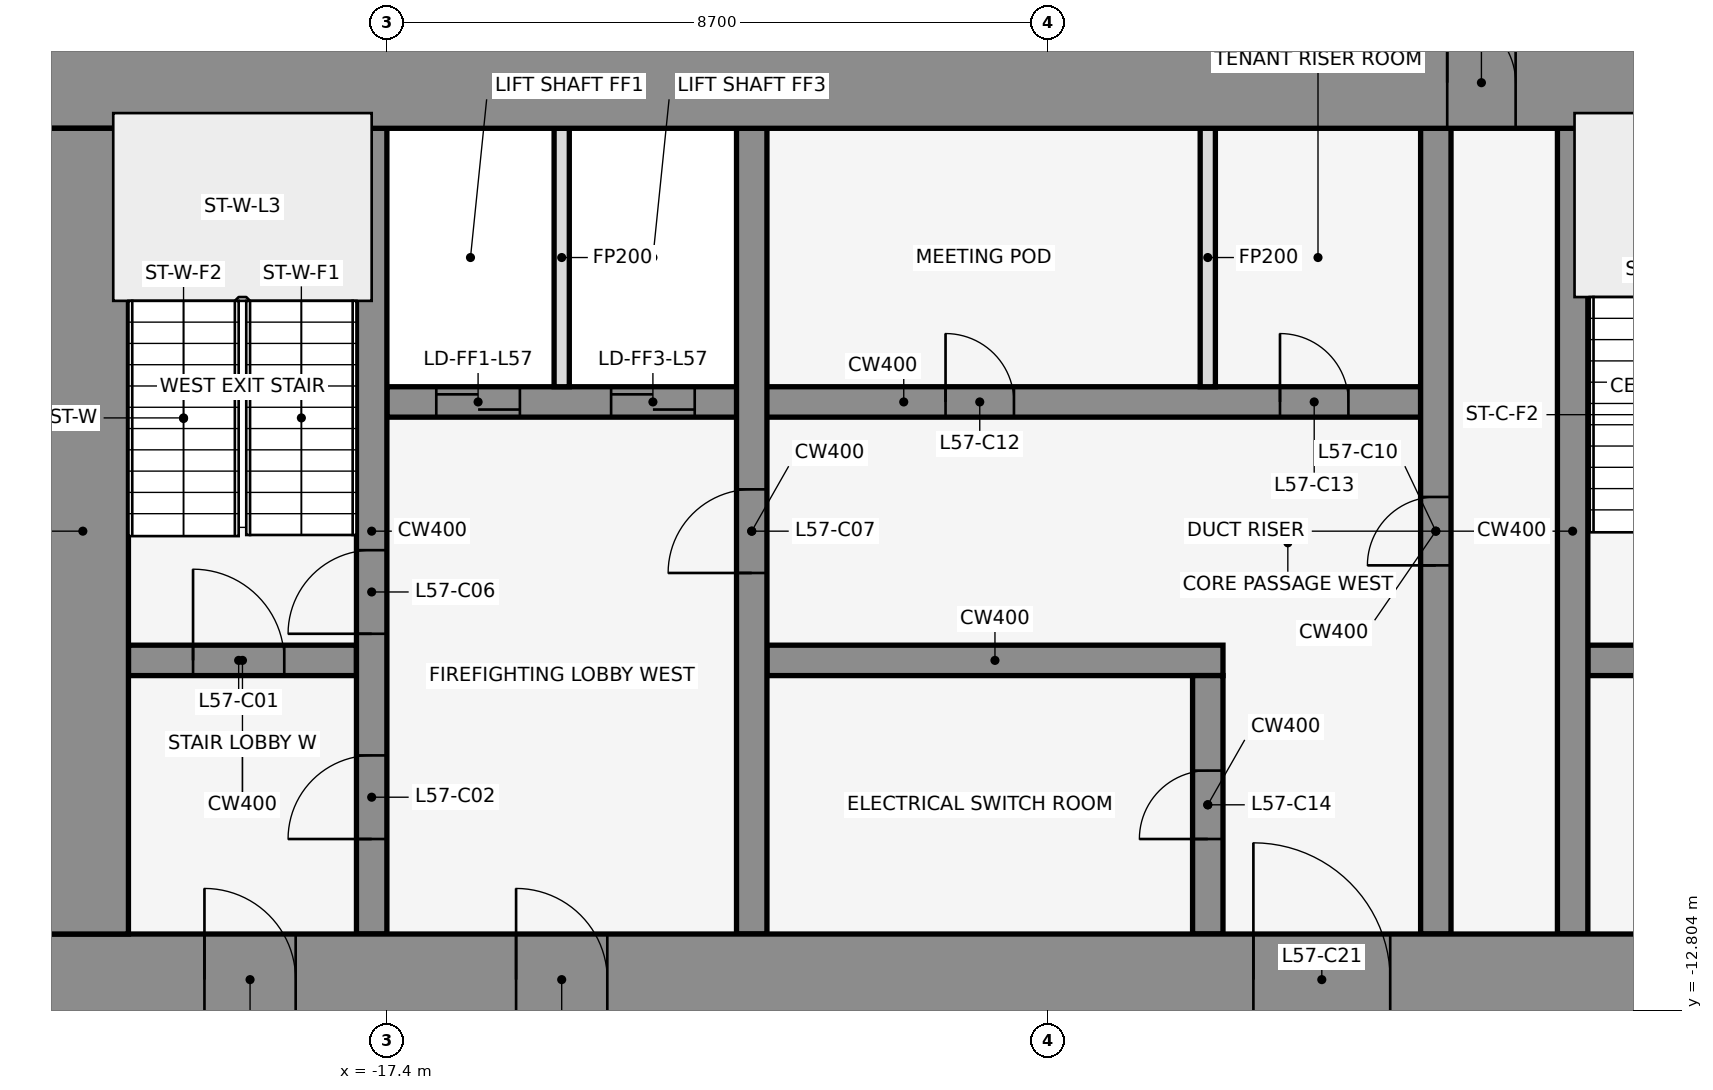
"""IFC4 building model, lengths in metres.
Left out: names, types, materials, properties, quantities, classifications, styles, units other than length and angle.
Written with IfcOpenShell. Run it as: python <this file> out.ifc"""

import sys

from ifc_helpers import new_model, si_unit, direction, frame, frame_2d, origin, place, context, subcontext, project, spatial, rectangle, extrude, element, fill, save


model = new_model("IFC4")
c1 = context("Model", 3, precision=1e-05, world=origin(), true_north=direction((0.0, 1.0)))
c2 = subcontext(c1, "Body", "Model", "MODEL_VIEW")
j1 = project(units=[si_unit("LENGTHUNIT", "METRE"), si_unit("PLANEANGLEUNIT", "RADIAN")], contexts=[c1])
p1 = place(None, origin())
s1 = spatial("IfcSite", under=j1, at=p1, CompositionType="ELEMENT")
p2 = place(p1, origin())
s2 = spatial("IfcBuilding", under=s1, at=p2, CompositionType="ELEMENT")
p3 = place(p2, frame((0.0, 0.0, 254.0)))
s3 = spatial("IfcBuildingStorey", under=s2, at=p3, CompositionType="ELEMENT", Elevation=254.0)
for number, where, z_axis, x_axis in (
    (1, (-0.068, -0.105, 0.0), (0.0, 0.0, 1.0), (-0.84, 0.543, 0.0)),
    (2, (-14.599, 1.08, 0.0), (0.0, 0.0, 1.0), (-0.84, -0.543, 0.0)),
):
    element("IfcWall", number, at=place(p3, frame(where, z_axis=z_axis, x_axis=x_axis)), inside=s3, PredefinedType="STANDARD", context=c2, shape_type="SweptSolid", body=[
        extrude(rectangle(XDim=2.183, YDim=0.25, at=frame_2d((1.091, 0.0))), origin(), (0.0, 0.0, 1.0), 4.05),
    ])
p4 = place(p3, frame((-20.8, -8.2, 0.0), z_axis=(0.0, 0.0, 1.0), x_axis=(1.0, 0.0, 0.0)))
e3 = element("IfcWall", 3, at=p4, inside=s3, PredefinedType="SHEAR", context=c2, shape_type="SweptSolid", body=[
    extrude(rectangle(XDim=3.0, YDim=0.4, at=frame_2d((1.5, 0.0))), origin(), (0.0, 0.0, 1.0), 4.2),
])
p5 = place(p4, frame((0.85, 0.0, 0.0)))
e4 = element("IfcOpeningElement", 4, at=p5, cuts=e3, PredefinedType="OPENING", context=c2, shape_type="SweptSolid", body=[
    extrude(rectangle(XDim=1.2, YDim=2.1, at=frame_2d((0.6, 1.05))), frame((0.0, 0.212, 0.0), z_axis=(0.0, -1.0, 0.0), x_axis=(1.0, 0.0, 0.0)), (0.0, 0.0, 1.0), 0.424),
])
p6 = place(p3, frame((-12.4, -8.2, 0.0), z_axis=(0.0, 0.0, 1.0), x_axis=(1.0, 0.0, 0.0)))
e5 = element("IfcWall", 5, at=p6, inside=s3, PredefinedType="SHEAR", context=c2, shape_type="SweptSolid", body=[
    extrude(rectangle(XDim=6.0, YDim=0.4, at=frame_2d((3.0, 0.0))), origin(), (0.0, 0.0, 1.0), 4.2),
])
p7 = place(p3, frame((-1.6, -8.2, 0.0), z_axis=(0.0, 0.0, 1.0), x_axis=(1.0, 0.0, 0.0)))
e6 = element("IfcWall", 6, at=p7, inside=s3, PredefinedType="SHEAR", context=c2, shape_type="SweptSolid", body=[
    extrude(rectangle(XDim=3.2, YDim=0.4, at=frame_2d((1.6, 0.0))), origin(), (0.0, 0.0, 1.0), 4.2),
])
p8 = place(p7, frame((1.05, 0.0, 0.0)))
e7 = element("IfcOpeningElement", 7, at=p8, cuts=e6, PredefinedType="OPENING", context=c2, shape_type="SweptSolid", body=[
    extrude(rectangle(XDim=1.2, YDim=2.1, at=frame_2d((0.6, 1.05))), frame((0.0, 0.212, 0.0), z_axis=(0.0, -1.0, 0.0), x_axis=(1.0, 0.0, 0.0)), (0.0, 0.0, 1.0), 0.424),
])
p9 = place(p3, frame((-17.4, -4.8, 0.0), z_axis=(0.0, 0.0, 1.0), x_axis=(1.0, 0.0, 0.0)))
e8 = element("IfcWall", 8, at=p9, inside=s3, PredefinedType="SHEAR", context=c2, shape_type="SweptSolid", body=[
    extrude(rectangle(XDim=13.6, YDim=0.4, at=frame_2d((6.8, 0.0))), origin(), (0.0, 0.0, 1.0), 4.2),
])
p10 = place(p9, frame((0.65, 0.0, 0.0)))
e9 = element("IfcOpeningElement", 9, at=p10, cuts=e8, PredefinedType="OPENING", context=c2, shape_type="SweptSolid", body=[
    extrude(rectangle(XDim=1.1, YDim=2.1, at=frame_2d((0.55, 1.05))), frame((0.0, 0.212, 0.0), z_axis=(0.0, -1.0, 0.0), x_axis=(1.0, 0.0, 0.0)), (0.0, 0.0, 1.0), 0.424),
])
p11 = place(p9, frame((2.95, 0.0, 0.0)))
e10 = element("IfcOpeningElement", 10, at=p11, cuts=e8, PredefinedType="OPENING", context=c2, shape_type="SweptSolid", body=[
    extrude(rectangle(XDim=1.1, YDim=2.1, at=frame_2d((0.55, 1.05))), frame((0.0, 0.212, 0.0), z_axis=(0.0, -1.0, 0.0), x_axis=(1.0, 0.0, 0.0)), (0.0, 0.0, 1.0), 0.424),
])
p12 = place(p9, frame((7.35, 0.0, 0.0)))
e11 = element("IfcOpeningElement", 11, at=p12, cuts=e8, PredefinedType="OPENING", context=c2, shape_type="SweptSolid", body=[
    extrude(rectangle(XDim=0.9, YDim=2.1, at=frame_2d((0.45, 1.05))), frame((0.0, 0.212, 0.0), z_axis=(0.0, -1.0, 0.0), x_axis=(1.0, 0.0, 0.0)), (0.0, 0.0, 1.0), 0.424),
])
p13 = place(p9, frame((11.75, 0.0, 0.0)))
e12 = element("IfcOpeningElement", 12, at=p13, cuts=e8, PredefinedType="OPENING", context=c2, shape_type="SweptSolid", body=[
    extrude(rectangle(XDim=0.9, YDim=2.1, at=frame_2d((0.45, 1.05))), frame((0.0, 0.212, 0.0), z_axis=(0.0, -1.0, 0.0), x_axis=(1.0, 0.0, 0.0)), (0.0, 0.0, 1.0), 0.424),
])
p14 = place(p3, frame((-17.6, -11.8, 0.0), z_axis=(0.0, 0.0, 1.0), x_axis=(0.0, 1.0, 0.0)))
e13 = element("IfcWall", 13, at=p14, inside=s3, PredefinedType="SHEAR", context=c2, shape_type="SweptSolid", body=[
    extrude(rectangle(XDim=10.6, YDim=0.4, at=frame_2d((5.3, 0.0))), origin(), (0.0, 0.0, 1.0), 4.2),
])
p15 = place(p14, frame((1.25, 0.0, 0.0)))
e14 = element("IfcOpeningElement", 14, at=p15, cuts=e13, PredefinedType="OPENING", context=c2, shape_type="SweptSolid", body=[
    extrude(rectangle(XDim=1.1, YDim=2.1, at=frame_2d((0.55, 1.05))), frame((0.0, 0.212, 0.0), z_axis=(0.0, -1.0, 0.0), x_axis=(1.0, 0.0, 0.0)), (0.0, 0.0, 1.0), 0.424),
])
p16 = place(p14, frame((3.95, 0.0, 0.0)))
e15 = element("IfcOpeningElement", 15, at=p16, cuts=e13, PredefinedType="OPENING", context=c2, shape_type="SweptSolid", body=[
    extrude(rectangle(XDim=1.1, YDim=2.1, at=frame_2d((0.55, 1.05))), frame((0.0, 0.212, 0.0), z_axis=(0.0, -1.0, 0.0), x_axis=(1.0, 0.0, 0.0)), (0.0, 0.0, 1.0), 0.424),
])
p17 = place(p3, frame((-15.1, -4.6, 0.0), z_axis=(0.0, 0.0, 1.0), x_axis=(0.0, 1.0, 0.0)))
e16 = element("IfcWall", 16, at=p17, inside=s3, PredefinedType="PARTITIONING", context=c2, shape_type="SweptSolid", body=[
    extrude(rectangle(XDim=3.4, YDim=0.2, at=frame_2d((1.7, 0.0))), origin(), (0.0, 0.0, 1.0), 3.118),
])
p18 = place(p3, frame((-12.6, -11.8, 0.0), z_axis=(0.0, 0.0, 1.0), x_axis=(0.0, 1.0, 0.0)))
e17 = element("IfcWall", 17, at=p18, inside=s3, PredefinedType="SHEAR", context=c2, shape_type="SweptSolid", body=[
    extrude(rectangle(XDim=10.6, YDim=0.4, at=frame_2d((5.3, 0.0))), origin(), (0.0, 0.0, 1.0), 4.2),
])
p19 = place(p18, frame((4.75, 0.0, 0.0)))
e18 = element("IfcOpeningElement", 18, at=p19, cuts=e17, PredefinedType="OPENING", context=c2, shape_type="SweptSolid", body=[
    extrude(rectangle(XDim=1.1, YDim=2.1, at=frame_2d((0.55, 1.05))), frame((0.0, 0.212, 0.0), z_axis=(0.0, -1.0, 0.0), x_axis=(1.0, 0.0, 0.0)), (0.0, 0.0, 1.0), 0.424),
])
p20 = place(p3, frame((-6.6, -11.8, 0.0), z_axis=(0.0, 0.0, 1.0), x_axis=(0.0, 1.0, 0.0)))
e19 = element("IfcWall", 19, at=p20, inside=s3, PredefinedType="SHEAR", context=c2, shape_type="SweptSolid", body=[
    extrude(rectangle(XDim=3.4, YDim=0.4, at=frame_2d((1.7, 0.0))), origin(), (0.0, 0.0, 1.0), 4.2),
])
p21 = place(p20, frame((1.25, 0.0, 0.0)))
e20 = element("IfcOpeningElement", 20, at=p21, cuts=e19, PredefinedType="OPENING", context=c2, shape_type="SweptSolid", body=[
    extrude(rectangle(XDim=0.9, YDim=2.1, at=frame_2d((0.45, 1.05))), frame((0.0, 0.212, 0.0), z_axis=(0.0, -1.0, 0.0), x_axis=(1.0, 0.0, 0.0)), (0.0, 0.0, 1.0), 0.424),
])
p22 = place(p3, frame((-6.6, -4.6, 0.0), z_axis=(0.0, 0.0, 1.0), x_axis=(0.0, 1.0, 0.0)))
e21 = element("IfcWall", 21, at=p22, inside=s3, PredefinedType="PARTITIONING", context=c2, shape_type="SweptSolid", body=[
    extrude(rectangle(XDim=3.4, YDim=0.2, at=frame_2d((1.7, 0.0))), origin(), (0.0, 0.0, 1.0), 3.118),
])
p23 = place(p3, frame((-3.6, -11.8, 0.0), z_axis=(0.0, 0.0, 1.0), x_axis=(0.0, 1.0, 0.0)))
e22 = element("IfcWall", 22, at=p23, inside=s3, PredefinedType="SHEAR", context=c2, shape_type="SweptSolid", body=[
    extrude(rectangle(XDim=10.6, YDim=0.4, at=frame_2d((5.3, 0.0))), origin(), (0.0, 0.0, 1.0), 4.2),
])
p24 = place(p23, frame((4.85, 0.0, 0.0)))
e23 = element("IfcOpeningElement", 23, at=p24, cuts=e22, PredefinedType="OPENING", context=c2, shape_type="SweptSolid", body=[
    extrude(rectangle(XDim=0.9, YDim=2.1, at=frame_2d((0.45, 1.05))), frame((0.0, 0.212, 0.0), z_axis=(0.0, -1.0, 0.0), x_axis=(1.0, 0.0, 0.0)), (0.0, 0.0, 1.0), 0.424),
])
p25 = place(p3, frame((-1.8, -11.8, 0.0), z_axis=(0.0, 0.0, 1.0), x_axis=(0.0, 1.0, 0.0)))
e24 = element("IfcWall", 24, at=p25, inside=s3, PredefinedType="SHEAR", context=c2, shape_type="SweptSolid", body=[
    extrude(rectangle(XDim=10.6, YDim=0.4, at=frame_2d((5.3, 0.0))), origin(), (0.0, 0.0, 1.0), 4.2),
])
p26 = place(p3, frame((-22.0, -0.6, 0.0), z_axis=(0.0, 0.0, 1.0), x_axis=(1.0, 0.0, 0.0)))
e25 = element("IfcWall", 25, at=p26, inside=s3, PredefinedType="SHEAR", context=c2, shape_type="SweptSolid", body=[
    extrude(rectangle(XDim=44.0, YDim=1.2, at=frame_2d((22.0, 0.0))), origin(), (0.0, 0.0, 1.0), 4.2),
])
p27 = place(p26, frame((18.55, 0.0, 0.0)))
e26 = element("IfcOpeningElement", 26, at=p27, cuts=e25, PredefinedType="OPENING", context=c2, shape_type="SweptSolid", body=[
    extrude(rectangle(XDim=0.9, YDim=2.1, at=frame_2d((0.45, 1.05))), frame((0.0, 0.612, 0.0), z_axis=(0.0, -1.0, 0.0), x_axis=(1.0, 0.0, 0.0)), (0.0, 0.0, 1.0), 1.224),
])
p28 = place(p26, frame((24.55, 0.0, 0.0)))
e27 = element("IfcOpeningElement", 27, at=p28, cuts=e25, PredefinedType="OPENING", context=c2, shape_type="SweptSolid", body=[
    extrude(rectangle(XDim=0.9, YDim=2.1, at=frame_2d((0.45, 1.05))), frame((0.0, 0.612, 0.0), z_axis=(0.0, -1.0, 0.0), x_axis=(1.0, 0.0, 0.0)), (0.0, 0.0, 1.0), 1.224),
])
p29 = place(p3, frame((-22.0, -12.4, 0.0), z_axis=(0.0, 0.0, 1.0), x_axis=(1.0, 0.0, 0.0)))
e28 = element("IfcWall", 28, at=p29, inside=s3, PredefinedType="SHEAR", context=c2, shape_type="SweptSolid", body=[
    extrude(rectangle(XDim=44.0, YDim=1.2, at=frame_2d((22.0, 0.0))), origin(), (0.0, 0.0, 1.0), 4.2),
])
p30 = place(p29, frame((2.2, 0.0, 0.0)))
e29 = element("IfcOpeningElement", 29, at=p30, cuts=e28, PredefinedType="OPENING", context=c2, shape_type="SweptSolid", body=[
    extrude(rectangle(XDim=1.2, YDim=2.1, at=frame_2d((0.6, 1.05))), frame((0.0, 0.612, 0.0), z_axis=(0.0, -1.0, 0.0), x_axis=(1.0, 0.0, 0.0)), (0.0, 0.0, 1.0), 1.224),
])
p31 = place(p29, frame((21.4, 0.0, 0.0)))
e30 = element("IfcOpeningElement", 30, at=p31, cuts=e28, PredefinedType="OPENING", context=c2, shape_type="SweptSolid", body=[
    extrude(rectangle(XDim=1.2, YDim=2.1, at=frame_2d((0.6, 1.05))), frame((0.0, 0.612, 0.0), z_axis=(0.0, -1.0, 0.0), x_axis=(1.0, 0.0, 0.0)), (0.0, 0.0, 1.0), 1.224),
])
p32 = place(p29, frame((40.6, 0.0, 0.0)))
e31 = element("IfcOpeningElement", 31, at=p32, cuts=e28, PredefinedType="OPENING", context=c2, shape_type="SweptSolid", body=[
    extrude(rectangle(XDim=1.2, YDim=2.1, at=frame_2d((0.6, 1.05))), frame((0.0, 0.612, 0.0), z_axis=(0.0, -1.0, 0.0), x_axis=(1.0, 0.0, 0.0)), (0.0, 0.0, 1.0), 1.224),
])
p33 = place(p29, frame((16.0, 0.0, 0.0)))
e32 = element("IfcOpeningElement", 32, at=p33, cuts=e28, PredefinedType="OPENING", context=c2, shape_type="SweptSolid", body=[
    extrude(rectangle(XDim=1.8, YDim=2.1, at=frame_2d((0.9, 1.05))), frame((0.0, 0.612, 0.0), z_axis=(0.0, -1.0, 0.0), x_axis=(1.0, 0.0, 0.0)), (0.0, 0.0, 1.0), 1.224),
])
p34 = place(p29, frame((6.3, 0.0, 0.0)))
e33 = element("IfcOpeningElement", 33, at=p34, cuts=e28, PredefinedType="OPENING", context=c2, shape_type="SweptSolid", body=[
    extrude(rectangle(XDim=1.2, YDim=2.1, at=frame_2d((0.6, 1.05))), frame((0.0, 0.612, 0.0), z_axis=(0.0, -1.0, 0.0), x_axis=(1.0, 0.0, 0.0)), (0.0, 0.0, 1.0), 1.224),
])
p35 = place(p29, frame((26.2, 0.0, 0.0)))
e34 = element("IfcOpeningElement", 34, at=p35, cuts=e28, PredefinedType="OPENING", context=c2, shape_type="SweptSolid", body=[
    extrude(rectangle(XDim=1.8, YDim=2.1, at=frame_2d((0.9, 1.05))), frame((0.0, 0.612, 0.0), z_axis=(0.0, -1.0, 0.0), x_axis=(1.0, 0.0, 0.0)), (0.0, 0.0, 1.0), 1.224),
])
p36 = place(p29, frame((36.5, 0.0, 0.0)))
e35 = element("IfcOpeningElement", 35, at=p36, cuts=e28, PredefinedType="OPENING", context=c2, shape_type="SweptSolid", body=[
    extrude(rectangle(XDim=1.2, YDim=2.1, at=frame_2d((0.6, 1.05))), frame((0.0, 0.612, 0.0), z_axis=(0.0, -1.0, 0.0), x_axis=(1.0, 0.0, 0.0)), (0.0, 0.0, 1.0), 1.224),
])
p37 = place(p3, frame((-21.4, -11.8, 0.0), z_axis=(0.0, 0.0, 1.0), x_axis=(0.0, 1.0, 0.0)))
e36 = element("IfcWall", 36, at=p37, inside=s3, PredefinedType="SHEAR", context=c2, shape_type="SweptSolid", body=[
    extrude(rectangle(XDim=10.6, YDim=1.2, at=frame_2d((5.3, 0.0))), origin(), (0.0, 0.0, 1.0), 4.2),
])
p38 = place(p5, origin())
e37 = element("IfcDoor", 37, at=p38, inside=s3, OperationType="SINGLE_SWING_LEFT", PredefinedType="DOOR", context=c2, shape_type="SweptSolid", body=[
    extrude(rectangle(XDim=1.2, YDim=2.1, at=frame_2d((0.6, 1.05))), frame((0.0, 0.025, 0.0), z_axis=(0.0, -1.0, 0.0), x_axis=(1.0, 0.0, 0.0)), (0.0, 0.0, 1.0), 0.05),
])
fill(e4, e37)
p39 = place(p15, frame((1.1, 0.0, 0.0), z_axis=(0.0, 0.0, 1.0), x_axis=(-1.0, 0.0, 0.0)))
e38 = element("IfcDoor", 38, at=p39, inside=s3, OperationType="SINGLE_SWING_LEFT", PredefinedType="DOOR", context=c2, shape_type="SweptSolid", body=[
    extrude(rectangle(XDim=1.1, YDim=2.1, at=frame_2d((0.55, 1.05))), frame((0.0, 0.025, 0.0), z_axis=(0.0, -1.0, 0.0), x_axis=(1.0, 0.0, 0.0)), (0.0, 0.0, 1.0), 0.05),
])
fill(e14, e38)
p40 = place(p10, origin())
e39 = element("IfcDoor", 39, at=p40, inside=s3, OperationType="DOUBLE_DOOR_SLIDING", PredefinedType="DOOR", context=c2, shape_type="SweptSolid", body=[
    extrude(rectangle(XDim=1.1, YDim=2.1, at=frame_2d((0.55, 1.05))), frame((0.0, 0.025, 0.0), z_axis=(0.0, -1.0, 0.0), x_axis=(1.0, 0.0, 0.0)), (0.0, 0.0, 1.0), 0.05),
])
fill(e9, e39)
p41 = place(p11, origin())
e40 = element("IfcDoor", 40, at=p41, inside=s3, OperationType="DOUBLE_DOOR_SLIDING", PredefinedType="DOOR", context=c2, shape_type="SweptSolid", body=[
    extrude(rectangle(XDim=1.1, YDim=2.1, at=frame_2d((0.55, 1.05))), frame((0.0, 0.025, 0.0), z_axis=(0.0, -1.0, 0.0), x_axis=(1.0, 0.0, 0.0)), (0.0, 0.0, 1.0), 0.05),
])
fill(e10, e40)
p42 = place(p16, frame((1.1, 0.0, 0.0), z_axis=(0.0, 0.0, 1.0), x_axis=(-1.0, 0.0, 0.0)))
e41 = element("IfcDoor", 41, at=p42, inside=s3, OperationType="SINGLE_SWING_LEFT", PredefinedType="DOOR", context=c2, shape_type="SweptSolid", body=[
    extrude(rectangle(XDim=1.1, YDim=2.1, at=frame_2d((0.55, 1.05))), frame((0.0, 0.025, 0.0), z_axis=(0.0, -1.0, 0.0), x_axis=(1.0, 0.0, 0.0)), (0.0, 0.0, 1.0), 0.05),
])
fill(e15, e41)
p43 = place(p19, origin())
e42 = element("IfcDoor", 42, at=p43, inside=s3, OperationType="SINGLE_SWING_LEFT", PredefinedType="DOOR", context=c2, shape_type="SweptSolid", body=[
    extrude(rectangle(XDim=1.1, YDim=2.1, at=frame_2d((0.55, 1.05))), frame((0.0, 0.025, 0.0), z_axis=(0.0, -1.0, 0.0), x_axis=(1.0, 0.0, 0.0)), (0.0, 0.0, 1.0), 0.05),
])
fill(e18, e42)
p44 = place(p24, frame((0.9, 0.0, 0.0), z_axis=(0.0, 0.0, 1.0), x_axis=(-1.0, 0.0, 0.0)))
e43 = element("IfcDoor", 43, at=p44, inside=s3, OperationType="SINGLE_SWING_LEFT", PredefinedType="DOOR", context=c2, shape_type="SweptSolid", body=[
    extrude(rectangle(XDim=0.9, YDim=2.1, at=frame_2d((0.45, 1.05))), frame((0.0, 0.025, 0.0), z_axis=(0.0, -1.0, 0.0), x_axis=(1.0, 0.0, 0.0)), (0.0, 0.0, 1.0), 0.05),
])
fill(e23, e43)
p45 = place(p12, origin())
e44 = element("IfcDoor", 44, at=p45, inside=s3, OperationType="SINGLE_SWING_RIGHT", PredefinedType="DOOR", context=c2, shape_type="SweptSolid", body=[
    extrude(rectangle(XDim=0.9, YDim=2.1, at=frame_2d((0.45, 1.05))), frame((0.0, 0.025, 0.0), z_axis=(0.0, -1.0, 0.0), x_axis=(1.0, 0.0, 0.0)), (0.0, 0.0, 1.0), 0.05),
])
fill(e11, e44)
p46 = place(p13, origin())
e45 = element("IfcDoor", 45, at=p46, inside=s3, OperationType="SINGLE_SWING_LEFT", PredefinedType="DOOR", context=c2, shape_type="SweptSolid", body=[
    extrude(rectangle(XDim=0.9, YDim=2.1, at=frame_2d((0.45, 1.05))), frame((0.0, 0.025, 0.0), z_axis=(0.0, -1.0, 0.0), x_axis=(1.0, 0.0, 0.0)), (0.0, 0.0, 1.0), 0.05),
])
fill(e12, e45)
p47 = place(p21, origin())
e46 = element("IfcDoor", 46, at=p47, inside=s3, OperationType="SINGLE_SWING_RIGHT", PredefinedType="DOOR", context=c2, shape_type="SweptSolid", body=[
    extrude(rectangle(XDim=0.9, YDim=2.1, at=frame_2d((0.45, 1.05))), frame((0.0, 0.025, 0.0), z_axis=(0.0, -1.0, 0.0), x_axis=(1.0, 0.0, 0.0)), (0.0, 0.0, 1.0), 0.05),
])
fill(e20, e46)
p48 = place(p27, origin())
e47 = element("IfcDoor", 47, at=p48, inside=s3, OperationType="SINGLE_SWING_LEFT", PredefinedType="DOOR", context=c2, shape_type="SweptSolid", body=[
    extrude(rectangle(XDim=0.9, YDim=2.1, at=frame_2d((0.45, 1.05))), frame((0.0, 0.025, 0.0), z_axis=(0.0, -1.0, 0.0), x_axis=(1.0, 0.0, 0.0)), (0.0, 0.0, 1.0), 0.05),
])
fill(e26, e47)
p49 = place(p30, frame((1.2, 0.0, 0.0), z_axis=(0.0, 0.0, 1.0), x_axis=(-1.0, 0.0, 0.0)))
e48 = element("IfcDoor", 48, at=p49, inside=s3, OperationType="SINGLE_SWING_RIGHT", PredefinedType="DOOR", context=c2, shape_type="SweptSolid", body=[
    extrude(rectangle(XDim=1.2, YDim=2.1, at=frame_2d((0.6, 1.05))), frame((0.0, 0.025, 0.0), z_axis=(0.0, -1.0, 0.0), x_axis=(1.0, 0.0, 0.0)), (0.0, 0.0, 1.0), 0.05),
])
fill(e29, e48)
p50 = place(p33, origin())
e49 = element("IfcDoor", 49, at=p50, inside=s3, OperationType="SINGLE_SWING_LEFT", PredefinedType="DOOR", context=c2, shape_type="SweptSolid", body=[
    extrude(rectangle(XDim=1.8, YDim=2.1, at=frame_2d((0.9, 1.05))), frame((0.0, 0.025, 0.0), z_axis=(0.0, -1.0, 0.0), x_axis=(1.0, 0.0, 0.0)), (0.0, 0.0, 1.0), 0.05),
])
fill(e32, e49)
p51 = place(p34, frame((1.2, 0.0, 0.0), z_axis=(0.0, 0.0, 1.0), x_axis=(-1.0, 0.0, 0.0)))
e50 = element("IfcDoor", 50, at=p51, inside=s3, OperationType="SINGLE_SWING_RIGHT", PredefinedType="DOOR", context=c2, shape_type="SweptSolid", body=[
    extrude(rectangle(XDim=1.2, YDim=2.1, at=frame_2d((0.6, 1.05))), frame((0.0, 0.025, 0.0), z_axis=(0.0, -1.0, 0.0), x_axis=(1.0, 0.0, 0.0)), (0.0, 0.0, 1.0), 0.05),
])
fill(e33, e50)
save(model, sys.argv[1])
